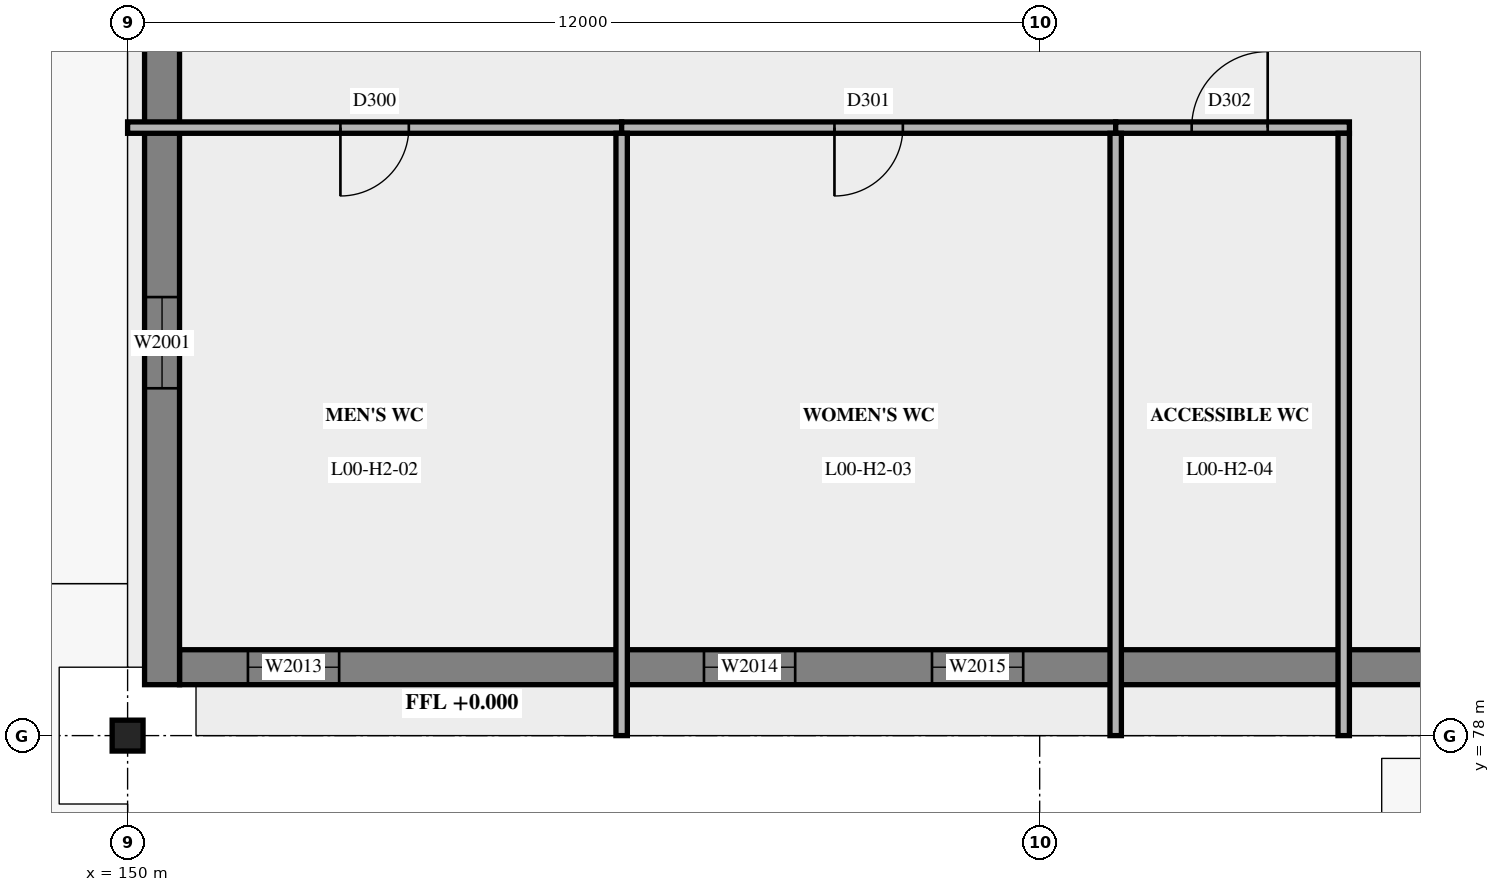
"""IFC4 building model, lengths in metres.
Left out: names, types, materials, properties, quantities, classifications, styles, units other than length and angle.
Written with IfcOpenShell. Run it as: python <this file> out.ifc"""

import sys

from ifc_helpers import new_model, si_unit, direction, frame, frame_2d, origin, origin_2d, place, context, subcontext, project, spatial, rectangle, hollow_circle, extrude, element, fill, save


model = new_model("IFC4")
c1 = context("Model", 3, precision=1e-05, world=origin(), true_north=direction((0.0, 1.0)))
c2 = subcontext(c1, "Body", "Model", "MODEL_VIEW")
j1 = project(units=[si_unit("LENGTHUNIT", "METRE"), si_unit("PLANEANGLEUNIT", "RADIAN")], contexts=[c1])
p1 = place(None, origin())
s1 = spatial("IfcSite", under=j1, at=p1, CompositionType="ELEMENT")
p2 = place(p1, origin())
s2 = spatial("IfcBuilding", under=s1, at=p2, CompositionType="ELEMENT")
p3 = place(p2, origin())
s3 = spatial("IfcBuildingStorey", under=s2, at=p3, CompositionType="ELEMENT", Elevation=0.0)
p4 = place(p3, frame((150.0, 78.0, 0.0), z_axis=(0.0, 0.0, 1.0), x_axis=(1.0, 0.0, 0.0)))
e1 = element("IfcColumn", 1, at=p4, inside=s3, PredefinedType="COLUMN", context=c2, shape_type="SweptSolid", body=[
    extrude(hollow_circle(Radius=0.203, WallThickness=0.016, at=origin_2d()), origin(), (0.0, 0.0, 1.0), 5.4),
])
p5 = place(p3, frame((150.683, 78.9, 0.0), z_axis=(0.0, 0.0, 1.0), x_axis=(1.0, 0.0, 0.0)))
e2 = element("IfcWall", 2, at=p5, inside=s3, PredefinedType="SOLIDWALL", context=c2, shape_type="SweptSolid", body=[
    extrude(rectangle(XDim=46.634, YDim=0.46, at=frame_2d((23.317, 0.0))), origin(), (0.0, 0.0, 1.0), 5.4),
])
p6 = place(p5, frame((23.817, 0.0, 0.0), z_axis=(0.0, 0.0, 1.0), x_axis=(-1.0, 0.0, 0.0)))
e3 = element("IfcOpeningElement", 3, at=p6, cuts=e2, PredefinedType="OPENING", context=c2, shape_type="SweptSolid", body=[
    extrude(rectangle(XDim=1.0, YDim=2.1, at=frame_2d((0.5, 1.05))), frame((0.0, 0.24, 0.0), z_axis=(0.0, -1.0, 0.0), x_axis=(1.0, 0.0, 0.0)), (0.0, 0.0, 1.0), 0.48),
])
p7 = place(p5, frame((41.817, 0.0, 0.0), z_axis=(0.0, 0.0, 1.0), x_axis=(-1.0, 0.0, 0.0)))
e4 = element("IfcOpeningElement", 4, at=p7, cuts=e2, PredefinedType="OPENING", context=c2, shape_type="SweptSolid", body=[
    extrude(rectangle(XDim=1.0, YDim=2.1, at=frame_2d((0.5, 1.05))), frame((0.0, 0.24, 0.0), z_axis=(0.0, -1.0, 0.0), x_axis=(1.0, 0.0, 0.0)), (0.0, 0.0, 1.0), 0.48),
])
p8 = place(p5, frame((33.217, 0.0, 0.0), z_axis=(0.0, 0.0, 1.0), x_axis=(-1.0, 0.0, 0.0)))
e5 = element("IfcOpeningElement", 5, at=p8, cuts=e2, PredefinedType="OPENING", context=c2, shape_type="SweptSolid", body=[
    extrude(rectangle(XDim=1.8, YDim=2.1, at=frame_2d((0.9, 1.05))), frame((0.0, 0.24, 0.0), z_axis=(0.0, -1.0, 0.0), x_axis=(1.0, 0.0, 0.0)), (0.0, 0.0, 1.0), 0.48),
])
p9 = place(p5, frame((0.9, 0.0, 0.9)))
e6 = element("IfcOpeningElement", 6, at=p9, cuts=e2, PredefinedType="OPENING", context=c2, shape_type="SweptSolid", body=[
    extrude(rectangle(XDim=1.2, YDim=3.3, at=frame_2d((0.6, 1.65))), frame((0.0, 0.24, 0.0), z_axis=(0.0, -1.0, 0.0), x_axis=(1.0, 0.0, 0.0)), (0.0, 0.0, 1.0), 0.48),
])
p10 = place(p5, frame((6.9, 0.0, 0.9)))
e7 = element("IfcOpeningElement", 7, at=p10, cuts=e2, PredefinedType="OPENING", context=c2, shape_type="SweptSolid", body=[
    extrude(rectangle(XDim=1.2, YDim=3.3, at=frame_2d((0.6, 1.65))), frame((0.0, 0.24, 0.0), z_axis=(0.0, -1.0, 0.0), x_axis=(1.0, 0.0, 0.0)), (0.0, 0.0, 1.0), 0.48),
])
p11 = place(p5, frame((9.9, 0.0, 0.9)))
e8 = element("IfcOpeningElement", 8, at=p11, cuts=e2, PredefinedType="OPENING", context=c2, shape_type="SweptSolid", body=[
    extrude(rectangle(XDim=1.2, YDim=3.3, at=frame_2d((0.6, 1.65))), frame((0.0, 0.24, 0.0), z_axis=(0.0, -1.0, 0.0), x_axis=(1.0, 0.0, 0.0)), (0.0, 0.0, 1.0), 0.48),
])
p12 = place(p5, frame((18.9, 0.0, 0.9)))
e9 = element("IfcOpeningElement", 9, at=p12, cuts=e2, PredefinedType="OPENING", context=c2, shape_type="SweptSolid", body=[
    extrude(rectangle(XDim=1.2, YDim=3.3, at=frame_2d((0.6, 1.65))), frame((0.0, 0.24, 0.0), z_axis=(0.0, -1.0, 0.0), x_axis=(1.0, 0.0, 0.0)), (0.0, 0.0, 1.0), 0.48),
])
p13 = place(p5, frame((24.9, 0.0, 0.9)))
e10 = element("IfcOpeningElement", 10, at=p13, cuts=e2, PredefinedType="OPENING", context=c2, shape_type="SweptSolid", body=[
    extrude(rectangle(XDim=1.2, YDim=3.3, at=frame_2d((0.6, 1.65))), frame((0.0, 0.24, 0.0), z_axis=(0.0, -1.0, 0.0), x_axis=(1.0, 0.0, 0.0)), (0.0, 0.0, 1.0), 0.48),
])
p14 = place(p5, frame((27.9, 0.0, 0.9)))
e11 = element("IfcOpeningElement", 11, at=p14, cuts=e2, PredefinedType="OPENING", context=c2, shape_type="SweptSolid", body=[
    extrude(rectangle(XDim=1.2, YDim=3.3, at=frame_2d((0.6, 1.65))), frame((0.0, 0.24, 0.0), z_axis=(0.0, -1.0, 0.0), x_axis=(1.0, 0.0, 0.0)), (0.0, 0.0, 1.0), 0.48),
])
p15 = place(p5, frame((36.9, 0.0, 0.9)))
e12 = element("IfcOpeningElement", 12, at=p15, cuts=e2, PredefinedType="OPENING", context=c2, shape_type="SweptSolid", body=[
    extrude(rectangle(XDim=1.2, YDim=3.3, at=frame_2d((0.6, 1.65))), frame((0.0, 0.24, 0.0), z_axis=(0.0, -1.0, 0.0), x_axis=(1.0, 0.0, 0.0)), (0.0, 0.0, 1.0), 0.48),
])
p16 = place(p5, frame((42.9, 0.0, 0.9)))
e13 = element("IfcOpeningElement", 13, at=p16, cuts=e2, PredefinedType="OPENING", context=c2, shape_type="SweptSolid", body=[
    extrude(rectangle(XDim=1.2, YDim=3.3, at=frame_2d((0.6, 1.65))), frame((0.0, 0.24, 0.0), z_axis=(0.0, -1.0, 0.0), x_axis=(1.0, 0.0, 0.0)), (0.0, 0.0, 1.0), 0.48),
])
p17 = place(p3, frame((150.453, 78.67, 0.0), z_axis=(0.0, 0.0, 1.0), x_axis=(0.0, 1.0, 0.0)))
e14 = element("IfcWall", 14, at=p17, inside=s3, PredefinedType="SOLIDWALL", context=c2, shape_type="SweptSolid", body=[
    extrude(rectangle(XDim=46.66, YDim=0.46, at=frame_2d((23.33, 0.0))), origin(), (0.0, 0.0, 1.0), 5.4),
])
p18 = place(p17, frame((35.73, 0.0, 0.0)))
e15 = element("IfcOpeningElement", 15, at=p18, cuts=e14, PredefinedType="OPENING", context=c2, shape_type="SweptSolid", body=[
    extrude(rectangle(XDim=1.0, YDim=2.1, at=frame_2d((0.5, 1.05))), frame((0.0, 0.24, 0.0), z_axis=(0.0, -1.0, 0.0), x_axis=(1.0, 0.0, 0.0)), (0.0, 0.0, 1.0), 0.48),
])
p19 = place(p17, frame((16.13, 0.0, 0.0)))
e16 = element("IfcOpeningElement", 16, at=p19, cuts=e14, PredefinedType="OPENING", context=c2, shape_type="SweptSolid", body=[
    extrude(rectangle(XDim=2.4, YDim=2.4, at=frame_2d((1.2, 1.2))), frame((0.0, 0.24, 0.0), z_axis=(0.0, -1.0, 0.0), x_axis=(1.0, 0.0, 0.0)), (0.0, 0.0, 1.0), 0.48),
])
p20 = place(p17, frame((8.83, 0.0, 0.0)))
e17 = element("IfcOpeningElement", 17, at=p20, cuts=e14, PredefinedType="OPENING", context=c2, shape_type="SweptSolid", body=[
    extrude(rectangle(XDim=1.0, YDim=2.1, at=frame_2d((0.5, 1.05))), frame((0.0, 0.24, 0.0), z_axis=(0.0, -1.0, 0.0), x_axis=(1.0, 0.0, 0.0)), (0.0, 0.0, 1.0), 0.48),
])
p21 = place(p17, frame((24.83, 0.0, 0.0)))
e18 = element("IfcOpeningElement", 18, at=p21, cuts=e14, PredefinedType="OPENING", context=c2, shape_type="SweptSolid", body=[
    extrude(rectangle(XDim=1.0, YDim=2.1, at=frame_2d((0.5, 1.05))), frame((0.0, 0.24, 0.0), z_axis=(0.0, -1.0, 0.0), x_axis=(1.0, 0.0, 0.0)), (0.0, 0.0, 1.0), 0.48),
])
p22 = place(p17, frame((31.43, 0.0, 0.0)))
e19 = element("IfcOpeningElement", 19, at=p22, cuts=e14, PredefinedType="OPENING", context=c2, shape_type="SweptSolid", body=[
    extrude(rectangle(XDim=1.8, YDim=2.1, at=frame_2d((0.9, 1.05))), frame((0.0, 0.24, 0.0), z_axis=(0.0, -1.0, 0.0), x_axis=(1.0, 0.0, 0.0)), (0.0, 0.0, 1.0), 0.48),
])
p23 = place(p17, frame((3.9, 0.0, 0.9)))
e20 = element("IfcOpeningElement", 20, at=p23, cuts=e14, PredefinedType="OPENING", context=c2, shape_type="SweptSolid", body=[
    extrude(rectangle(XDim=1.2, YDim=3.3, at=frame_2d((0.6, 1.65))), frame((0.0, 0.24, 0.0), z_axis=(0.0, -1.0, 0.0), x_axis=(1.0, 0.0, 0.0)), (0.0, 0.0, 1.0), 0.48),
])
p24 = place(p17, frame((27.9, 0.0, 0.9)))
e21 = element("IfcOpeningElement", 21, at=p24, cuts=e14, PredefinedType="OPENING", context=c2, shape_type="SweptSolid", body=[
    extrude(rectangle(XDim=1.2, YDim=3.3, at=frame_2d((0.6, 1.65))), frame((0.0, 0.24, 0.0), z_axis=(0.0, -1.0, 0.0), x_axis=(1.0, 0.0, 0.0)), (0.0, 0.0, 1.0), 0.48),
])
p25 = place(p17, frame((39.9, 0.0, 0.9)))
e22 = element("IfcOpeningElement", 22, at=p25, cuts=e14, PredefinedType="OPENING", context=c2, shape_type="SweptSolid", body=[
    extrude(rectangle(XDim=1.2, YDim=3.3, at=frame_2d((0.6, 1.65))), frame((0.0, 0.24, 0.0), z_axis=(0.0, -1.0, 0.0), x_axis=(1.0, 0.0, 0.0)), (0.0, 0.0, 1.0), 0.48),
])
p26 = place(p17, frame((42.9, 0.0, 0.9)))
e23 = element("IfcOpeningElement", 23, at=p26, cuts=e14, PredefinedType="OPENING", context=c2, shape_type="SweptSolid", body=[
    extrude(rectangle(XDim=1.2, YDim=3.3, at=frame_2d((0.6, 1.65))), frame((0.0, 0.24, 0.0), z_axis=(0.0, -1.0, 0.0), x_axis=(1.0, 0.0, 0.0)), (0.0, 0.0, 1.0), 0.48),
])
p27 = place(p3, frame((150.0, 86.0, 0.0), z_axis=(0.0, 0.0, 1.0), x_axis=(1.0, 0.0, 0.0)))
e24 = element("IfcWall", 24, at=p27, inside=s3, PredefinedType="PARTITIONING", context=c2, shape_type="SweptSolid", body=[
    extrude(rectangle(XDim=6.5, YDim=0.15, at=frame_2d((3.25, 0.0))), origin(), (0.0, 0.0, 1.0), 5.15),
])
p28 = place(p27, frame((2.8, 0.0, 0.0)))
e25 = element("IfcOpeningElement", 25, at=p28, cuts=e24, PredefinedType="OPENING", context=c2, shape_type="SweptSolid", body=[
    extrude(rectangle(XDim=0.9, YDim=2.1, at=frame_2d((0.45, 1.05))), frame((0.0, 0.085, 0.0), z_axis=(0.0, -1.0, 0.0), x_axis=(1.0, 0.0, 0.0)), (0.0, 0.0, 1.0), 0.17),
])
p29 = place(p3, frame((156.5, 86.0, 0.0), z_axis=(0.0, 0.0, 1.0), x_axis=(1.0, 0.0, 0.0)))
e26 = element("IfcWall", 26, at=p29, inside=s3, PredefinedType="PARTITIONING", context=c2, shape_type="SweptSolid", body=[
    extrude(rectangle(XDim=6.5, YDim=0.15, at=frame_2d((3.25, 0.0))), origin(), (0.0, 0.0, 1.0), 5.15),
])
p30 = place(p29, frame((2.8, 0.0, 0.0)))
e27 = element("IfcOpeningElement", 27, at=p30, cuts=e26, PredefinedType="OPENING", context=c2, shape_type="SweptSolid", body=[
    extrude(rectangle(XDim=0.9, YDim=2.1, at=frame_2d((0.45, 1.05))), frame((0.0, 0.085, 0.0), z_axis=(0.0, -1.0, 0.0), x_axis=(1.0, 0.0, 0.0)), (0.0, 0.0, 1.0), 0.17),
])
p31 = place(p3, frame((163.0, 86.0, 0.0), z_axis=(0.0, 0.0, 1.0), x_axis=(1.0, 0.0, 0.0)))
e28 = element("IfcWall", 28, at=p31, inside=s3, PredefinedType="PARTITIONING", context=c2, shape_type="SweptSolid", body=[
    extrude(rectangle(XDim=3.075, YDim=0.15, at=frame_2d((1.538, 0.0))), origin(), (0.0, 0.0, 1.0), 5.15),
])
p32 = place(p31, frame((1.0, 0.0, 0.0)))
e29 = element("IfcOpeningElement", 29, at=p32, cuts=e28, PredefinedType="OPENING", context=c2, shape_type="SweptSolid", body=[
    extrude(rectangle(XDim=1.0, YDim=2.1, at=frame_2d((0.5, 1.05))), frame((0.0, 0.085, 0.0), z_axis=(0.0, -1.0, 0.0), x_axis=(1.0, 0.0, 0.0)), (0.0, 0.0, 1.0), 0.17),
])
for number, where, z_axis, x_axis in (
    (30, (156.5, 78.0, 0.0), (0.0, 0.0, 1.0), (0.0, 1.0, 0.0)),
    (31, (163.0, 78.0, 0.0), (0.0, 0.0, 1.0), (0.0, 1.0, 0.0)),
    (32, (166.0, 78.0, 0.0), (0.0, 0.0, 1.0), (0.0, 1.0, 0.0)),
):
    element("IfcWall", number, at=place(p3, frame(where, z_axis=z_axis, x_axis=x_axis)), inside=s3, PredefinedType="PARTITIONING", context=c2, shape_type="SweptSolid", body=[
        extrude(rectangle(XDim=7.925, YDim=0.15, at=frame_2d((3.962, 0.0))), origin(), (0.0, 0.0, 1.0), 5.15),
    ])
p33 = place(p23, origin())
e33 = element("IfcWindow", 33, at=p33, inside=s3, PartitioningType="SINGLE_PANEL", PredefinedType="WINDOW", context=c2, shape_type="SweptSolid", body=[
    extrude(rectangle(XDim=1.2, YDim=3.3, at=frame_2d((0.6, 1.65))), frame((0.0, 0.03, 0.0), z_axis=(0.0, -1.0, 0.0), x_axis=(1.0, 0.0, 0.0)), (0.0, 0.0, 1.0), 0.06),
])
fill(e20, e33)
p34 = place(p9, origin())
e34 = element("IfcWindow", 34, at=p34, inside=s3, PartitioningType="SINGLE_PANEL", PredefinedType="WINDOW", context=c2, shape_type="SweptSolid", body=[
    extrude(rectangle(XDim=1.2, YDim=3.3, at=frame_2d((0.6, 1.65))), frame((0.0, 0.03, 0.0), z_axis=(0.0, -1.0, 0.0), x_axis=(1.0, 0.0, 0.0)), (0.0, 0.0, 1.0), 0.06),
])
fill(e6, e34)
p35 = place(p10, origin())
e35 = element("IfcWindow", 35, at=p35, inside=s3, PartitioningType="SINGLE_PANEL", PredefinedType="WINDOW", context=c2, shape_type="SweptSolid", body=[
    extrude(rectangle(XDim=1.2, YDim=3.3, at=frame_2d((0.6, 1.65))), frame((0.0, 0.03, 0.0), z_axis=(0.0, -1.0, 0.0), x_axis=(1.0, 0.0, 0.0)), (0.0, 0.0, 1.0), 0.06),
])
fill(e7, e35)
p36 = place(p11, origin())
e36 = element("IfcWindow", 36, at=p36, inside=s3, PartitioningType="SINGLE_PANEL", PredefinedType="WINDOW", context=c2, shape_type="SweptSolid", body=[
    extrude(rectangle(XDim=1.2, YDim=3.3, at=frame_2d((0.6, 1.65))), frame((0.0, 0.03, 0.0), z_axis=(0.0, -1.0, 0.0), x_axis=(1.0, 0.0, 0.0)), (0.0, 0.0, 1.0), 0.06),
])
fill(e8, e36)
p37 = place(p28, origin())
e37 = element("IfcDoor", 37, at=p37, inside=s3, OperationType="SINGLE_SWING_RIGHT", PredefinedType="DOOR", context=c2, shape_type="SweptSolid", body=[
    extrude(rectangle(XDim=0.9, YDim=2.1, at=frame_2d((0.45, 1.05))), frame((0.0, 0.025, 0.0), z_axis=(0.0, -1.0, 0.0), x_axis=(1.0, 0.0, 0.0)), (0.0, 0.0, 1.0), 0.05),
])
fill(e25, e37)
p38 = place(p30, origin())
e38 = element("IfcDoor", 38, at=p38, inside=s3, OperationType="SINGLE_SWING_RIGHT", PredefinedType="DOOR", context=c2, shape_type="SweptSolid", body=[
    extrude(rectangle(XDim=0.9, YDim=2.1, at=frame_2d((0.45, 1.05))), frame((0.0, 0.025, 0.0), z_axis=(0.0, -1.0, 0.0), x_axis=(1.0, 0.0, 0.0)), (0.0, 0.0, 1.0), 0.05),
])
fill(e27, e38)
p39 = place(p32, origin())
e39 = element("IfcDoor", 39, at=p39, inside=s3, OperationType="SINGLE_SWING_RIGHT", PredefinedType="DOOR", context=c2, shape_type="SweptSolid", body=[
    extrude(rectangle(XDim=1.0, YDim=2.1, at=frame_2d((0.5, 1.05))), frame((0.0, 0.025, 0.0), z_axis=(0.0, -1.0, 0.0), x_axis=(1.0, 0.0, 0.0)), (0.0, 0.0, 1.0), 0.05),
])
fill(e29, e39)
save(model, sys.argv[1])
